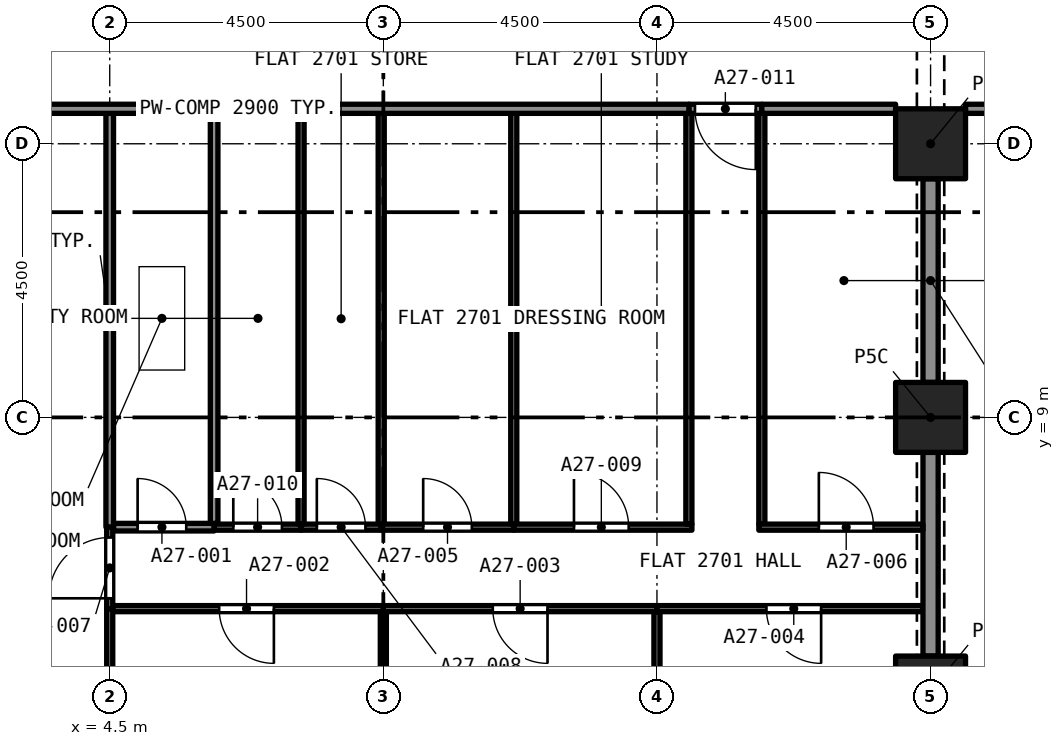
"""IFC4 building model, lengths in metres.
Left out: names, types, materials, properties, quantities, classifications, styles, units other than length and angle.
Written with IfcOpenShell. Run it as: python <this file> out.ifc"""

import sys

from ifc_helpers import new_model, si_unit, direction, frame, frame_2d, origin, origin_2d, place, context, subcontext, project, spatial, rectangle, extrude, element, fill, save


model = new_model("IFC4")
c1 = context("Model", 3, precision=1e-05, world=origin(), true_north=direction((0.0, 1.0)))
c2 = subcontext(c1, "Body", "Model", "MODEL_VIEW")
j1 = project(units=[si_unit("LENGTHUNIT", "METRE"), si_unit("PLANEANGLEUNIT", "RADIAN")], contexts=[c1])
p1 = place(None, origin())
s1 = spatial("IfcSite", under=j1, at=p1, CompositionType="ELEMENT")
p2 = place(p1, origin())
s2 = spatial("IfcBuilding", under=s1, at=p2, CompositionType="ELEMENT")
p3 = place(p2, frame((0.0, 0.0, 99.2)))
s3 = spatial("IfcBuildingStorey", under=s2, at=p3, CompositionType="ELEMENT", Elevation=99.2)
for number, where, z_axis, x_axis in (
    (1, (18.0, 4.5, 0.0), (0.0, 0.0, 1.0), (1.0, 0.0, 0.0)),
    (2, (18.0, 9.0, 0.0), (0.0, 0.0, 1.0), (1.0, 0.0, 0.0)),
    (3, (18.0, 13.5, 0.0), (0.0, 0.0, 1.0), (1.0, 0.0, 0.0)),
):
    element("IfcColumn", number, at=place(p3, frame(where, z_axis=z_axis, x_axis=x_axis)), inside=s3, PredefinedType="COLUMN", context=c2, shape_type="SweptSolid", body=[
        extrude(rectangle(XDim=1.15, YDim=1.15, at=origin_2d()), origin(), (0.0, 0.0, 1.0), 3.2),
    ])
p4 = place(p3, frame((4.562, 7.195, 0.0), z_axis=(0.0, 0.0, 1.0), x_axis=(1.0, 0.0, 0.0)))
e4 = element("IfcWall", 4, at=p4, inside=s3, PredefinedType="PARTITIONING", context=c2, shape_type="SweptSolid", body=[
    extrude(rectangle(XDim=1.655, YDim=0.125, at=frame_2d((0.827, 0.0))), origin(), (0.0, 0.0, 1.0), 2.9),
])
p5 = place(p4, frame((0.396, 0.0, 0.0)))
e5 = element("IfcOpeningElement", 5, at=p5, cuts=e4, PredefinedType="OPENING", context=c2, shape_type="SweptSolid", body=[
    extrude(rectangle(XDim=0.8, YDim=2.1, at=frame_2d((0.4, 1.05))), frame((0.0, 0.073, 0.0), z_axis=(0.0, -1.0, 0.0), x_axis=(1.0, 0.0, 0.0)), (0.0, 0.0, 1.0), 0.145),
])
p6 = place(p3, frame((4.5, 7.195, 0.0), z_axis=(0.0, 0.0, 1.0), x_axis=(0.0, 1.0, 0.0)))
e6 = element("IfcWall", 6, at=p6, inside=s3, PredefinedType="PARTITIONING", context=c2, shape_type="SweptSolid", body=[
    extrude(rectangle(XDim=6.805, YDim=0.125, at=frame_2d((3.402, 0.0))), origin(), (0.0, 0.0, 1.0), 2.9),
])
p7 = place(p3, frame((6.217, 7.258, 0.0), z_axis=(0.0, 0.0, 1.0), x_axis=(0.0, 1.0, 0.0)))
e7 = element("IfcWall", 7, at=p7, inside=s3, PredefinedType="PARTITIONING", context=c2, shape_type="SweptSolid", body=[
    extrude(rectangle(XDim=6.742, YDim=0.125, at=frame_2d((3.371, 0.0))), origin(), (0.0, 0.0, 1.0), 2.9),
])
p8 = place(p3, frame((9.0, 0.575, 0.0), z_axis=(0.0, 0.0, 1.0), x_axis=(0.0, 1.0, 0.0)))
e8 = element("IfcWall", 8, at=p8, inside=s3, PredefinedType="PARTITIONING", context=c2, shape_type="SweptSolid", body=[
    extrude(rectangle(XDim=5.23, YDim=0.1, at=frame_2d((2.615, 0.0))), origin(), (0.0, 0.0, 1.0), 2.9),
])
p9 = place(p3, frame((9.0, 5.855, 0.0), z_axis=(0.0, 0.0, 1.0), x_axis=(-1.0, 0.0, 0.0)))
e9 = element("IfcWall", 9, at=p9, inside=s3, PredefinedType="PARTITIONING", context=c2, shape_type="SweptSolid", body=[
    extrude(rectangle(XDim=4.45, YDim=0.1, at=frame_2d((2.225, 0.0))), origin(), (0.0, 0.0, 1.0), 2.9),
])
p10 = place(p9, frame((1.8, 0.0, 0.0)))
e10 = element("IfcOpeningElement", 10, at=p10, cuts=e9, PredefinedType="OPENING", context=c2, shape_type="SweptSolid", body=[
    extrude(rectangle(XDim=0.9, YDim=2.1, at=frame_2d((0.45, 1.05))), frame((0.0, 0.06, 0.0), z_axis=(0.0, -1.0, 0.0), x_axis=(1.0, 0.0, 0.0)), (0.0, 0.0, 1.0), 0.12),
])
p11 = place(p3, frame((4.5, 0.622, 0.0), z_axis=(0.0, 0.0, 1.0), x_axis=(0.0, 1.0, 0.0)))
e11 = element("IfcWall", 11, at=p11, inside=s3, PredefinedType="PARTITIONING", context=c2, shape_type="SweptSolid", body=[
    extrude(rectangle(XDim=5.233, YDim=0.1, at=frame_2d((2.616, 0.0))), origin(), (0.0, 0.0, 1.0), 2.9),
])
p12 = place(p3, frame((13.5, 0.575, 0.0), z_axis=(0.0, 0.0, 1.0), x_axis=(0.0, 1.0, 0.0)))
e12 = element("IfcWall", 12, at=p12, inside=s3, PredefinedType="PARTITIONING", context=c2, shape_type="SweptSolid", body=[
    extrude(rectangle(XDim=5.23, YDim=0.1, at=frame_2d((2.615, 0.0))), origin(), (0.0, 0.0, 1.0), 2.9),
])
p13 = place(p3, frame((13.5, 5.855, 0.0), z_axis=(0.0, 0.0, 1.0), x_axis=(-1.0, 0.0, 0.0)))
e13 = element("IfcWall", 13, at=p13, inside=s3, PredefinedType="PARTITIONING", context=c2, shape_type="SweptSolid", body=[
    extrude(rectangle(XDim=4.5, YDim=0.1, at=frame_2d((2.25, 0.0))), origin(), (0.0, 0.0, 1.0), 2.9),
])
p14 = place(p13, frame((1.8, 0.0, 0.0)))
e14 = element("IfcOpeningElement", 14, at=p14, cuts=e13, PredefinedType="OPENING", context=c2, shape_type="SweptSolid", body=[
    extrude(rectangle(XDim=0.9, YDim=2.1, at=frame_2d((0.45, 1.05))), frame((0.0, 0.06, 0.0), z_axis=(0.0, -1.0, 0.0), x_axis=(1.0, 0.0, 0.0)), (0.0, 0.0, 1.0), 0.12),
])
p15 = place(p3, frame((17.875, 5.855, 0.0), z_axis=(0.0, 0.0, 1.0), x_axis=(-1.0, 0.0, 0.0)))
e15 = element("IfcWall", 15, at=p15, inside=s3, PredefinedType="PARTITIONING", context=c2, shape_type="SweptSolid", body=[
    extrude(rectangle(XDim=4.375, YDim=0.1, at=frame_2d((2.188, 0.0))), origin(), (0.0, 0.0, 1.0), 2.9),
])
p16 = place(p15, frame((1.675, 0.0, 0.0)))
e16 = element("IfcOpeningElement", 16, at=p16, cuts=e15, PredefinedType="OPENING", context=c2, shape_type="SweptSolid", body=[
    extrude(rectangle(XDim=0.9, YDim=2.1, at=frame_2d((0.45, 1.05))), frame((0.0, 0.06, 0.0), z_axis=(0.0, -1.0, 0.0), x_axis=(1.0, 0.0, 0.0)), (0.0, 0.0, 1.0), 0.12),
])
p17 = place(p3, frame((18.0, 5.075, 0.0), z_axis=(0.0, 0.0, 1.0), x_axis=(0.0, 1.0, 0.0)))
e17 = element("IfcWall", 17, at=p17, inside=s3, PredefinedType="PARTITIONING", context=c2, shape_type="SweptSolid", body=[
    extrude(rectangle(XDim=3.35, YDim=0.25, at=frame_2d((1.675, 0.0))), origin(), (0.0, 0.0, 1.0), 2.38),
])
p18 = place(p3, frame((8.965, 7.195, 0.0), z_axis=(0.0, 0.0, 1.0), x_axis=(1.0, 0.0, 0.0)))
e18 = element("IfcWall", 18, at=p18, inside=s3, PredefinedType="PARTITIONING", context=c2, shape_type="SweptSolid", body=[
    extrude(rectangle(XDim=2.18, YDim=0.1, at=frame_2d((1.09, 0.0))), origin(), (0.0, 0.0, 1.0), 2.9),
])
p19 = place(p18, frame((0.69, 0.0, 0.0)))
e19 = element("IfcOpeningElement", 19, at=p19, cuts=e18, PredefinedType="OPENING", context=c2, shape_type="SweptSolid", body=[
    extrude(rectangle(XDim=0.8, YDim=2.1, at=frame_2d((0.4, 1.05))), frame((0.0, 0.06, 0.0), z_axis=(0.0, -1.0, 0.0), x_axis=(1.0, 0.0, 0.0)), (0.0, 0.0, 1.0), 0.12),
])
for number, where, z_axis, x_axis in (
    (20, (8.965, 7.245, 0.0), (0.0, 0.0, 1.0), (0.0, 1.0, 0.0)),
    (21, (11.145, 7.245, 0.0), (0.0, 0.0, 1.0), (0.0, 1.0, 0.0)),
    (22, (15.225, 7.245, 0.0), (0.0, 0.0, 1.0), (0.0, 1.0, 0.0)),
):
    element("IfcWall", number, at=place(p3, frame(where, z_axis=z_axis, x_axis=x_axis)), inside=s3, PredefinedType="PARTITIONING", context=c2, shape_type="SweptSolid", body=[
        extrude(rectangle(XDim=6.755, YDim=0.1, at=frame_2d((3.377, 0.0))), origin(), (0.0, 0.0, 1.0), 2.9),
    ])
p20 = place(p3, frame((15.175, 7.195, 0.0), z_axis=(0.0, 0.0, 1.0), x_axis=(1.0, 0.0, 0.0)))
e23 = element("IfcWall", 23, at=p20, inside=s3, PredefinedType="PARTITIONING", context=c2, shape_type="SweptSolid", body=[
    extrude(rectangle(XDim=2.7, YDim=0.1, at=frame_2d((1.35, 0.0))), origin(), (0.0, 0.0, 1.0), 2.9),
])
p21 = place(p20, frame((0.988, 0.0, 0.0)))
e24 = element("IfcOpeningElement", 24, at=p21, cuts=e23, PredefinedType="OPENING", context=c2, shape_type="SweptSolid", body=[
    extrude(rectangle(XDim=0.9, YDim=2.1, at=frame_2d((0.45, 1.05))), frame((0.0, 0.06, 0.0), z_axis=(0.0, -1.0, 0.0), x_axis=(1.0, 0.0, 0.0)), (0.0, 0.0, 1.0), 0.12),
])
p22 = place(p3, frame((4.5, 5.855, 0.0), z_axis=(0.0, 0.0, 1.0), x_axis=(0.0, 1.0, 0.0)))
e25 = element("IfcWall", 25, at=p22, inside=s3, PredefinedType="PARTITIONING", context=c2, shape_type="SweptSolid", body=[
    extrude(rectangle(XDim=1.34, YDim=0.1, at=frame_2d((0.67, 0.0))), origin(), (0.0, 0.0, 1.0), 2.9),
])
p23 = place(p22, frame((0.17, 0.0, 0.0)))
e26 = element("IfcOpeningElement", 26, at=p23, cuts=e25, PredefinedType="OPENING", context=c2, shape_type="SweptSolid", body=[
    extrude(rectangle(XDim=1.0, YDim=2.1, at=frame_2d((0.5, 1.05))), frame((0.0, 0.06, 0.0), z_axis=(0.0, -1.0, 0.0), x_axis=(1.0, 0.0, 0.0)), (0.0, 0.0, 1.0), 0.12),
])
p24 = place(p3, frame((7.647, 7.195, 0.0), z_axis=(0.0, 0.0, 1.0), x_axis=(1.0, 0.0, 0.0)))
e27 = element("IfcWall", 27, at=p24, inside=s3, PredefinedType="PARTITIONING", context=c2, shape_type="SweptSolid", body=[
    extrude(rectangle(XDim=1.318, YDim=0.1, at=frame_2d((0.659, 0.0))), origin(), (0.0, 0.0, 1.0), 2.9),
])
p25 = place(p24, frame((0.259, 0.0, 0.0)))
e28 = element("IfcOpeningElement", 28, at=p25, cuts=e27, PredefinedType="OPENING", context=c2, shape_type="SweptSolid", body=[
    extrude(rectangle(XDim=0.8, YDim=2.1, at=frame_2d((0.4, 1.05))), frame((0.0, 0.06, 0.0), z_axis=(0.0, -1.0, 0.0), x_axis=(1.0, 0.0, 0.0)), (0.0, 0.0, 1.0), 0.12),
])
p26 = place(p3, frame((11.145, 7.195, 0.0), z_axis=(0.0, 0.0, 1.0), x_axis=(1.0, 0.0, 0.0)))
e29 = element("IfcWall", 29, at=p26, inside=s3, PredefinedType="PARTITIONING", context=c2, shape_type="SweptSolid", body=[
    extrude(rectangle(XDim=2.93, YDim=0.1, at=frame_2d((1.465, 0.0))), origin(), (0.0, 0.0, 1.0), 2.9),
])
p27 = place(p26, frame((0.99, 0.0, 0.0)))
e30 = element("IfcOpeningElement", 30, at=p27, cuts=e29, PredefinedType="OPENING", context=c2, shape_type="SweptSolid", body=[
    extrude(rectangle(XDim=0.9, YDim=2.1, at=frame_2d((0.45, 1.05))), frame((0.0, 0.06, 0.0), z_axis=(0.0, -1.0, 0.0), x_axis=(1.0, 0.0, 0.0)), (0.0, 0.0, 1.0), 0.12),
])
p28 = place(p3, frame((14.025, 7.245, 0.0), z_axis=(0.0, 0.0, 1.0), x_axis=(0.0, 1.0, 0.0)))
e31 = element("IfcWall", 31, at=p28, inside=s3, PredefinedType="PARTITIONING", context=c2, shape_type="SweptSolid", body=[
    extrude(rectangle(XDim=6.755, YDim=0.1, at=frame_2d((3.377, 0.0))), origin(), (0.0, 0.0, 1.0), 2.9),
])
p29 = place(p3, frame((6.217, 7.195, 0.0), z_axis=(0.0, 0.0, 1.0), x_axis=(1.0, 0.0, 0.0)))
e32 = element("IfcWall", 32, at=p29, inside=s3, PredefinedType="PARTITIONING", context=c2, shape_type="SweptSolid", body=[
    extrude(rectangle(XDim=1.43, YDim=0.1, at=frame_2d((0.715, 0.0))), origin(), (0.0, 0.0, 1.0), 2.9),
])
p30 = place(p29, frame((0.315, 0.0, 0.0)))
e33 = element("IfcOpeningElement", 33, at=p30, cuts=e32, PredefinedType="OPENING", context=c2, shape_type="SweptSolid", body=[
    extrude(rectangle(XDim=0.8, YDim=2.1, at=frame_2d((0.4, 1.05))), frame((0.0, 0.06, 0.0), z_axis=(0.0, -1.0, 0.0), x_axis=(1.0, 0.0, 0.0)), (0.0, 0.0, 1.0), 0.12),
])
p31 = place(p3, frame((15.225, 14.075, 0.0), z_axis=(0.0, 0.0, 1.0), x_axis=(-1.0, 0.0, 0.0)))
e34 = element("IfcWall", 34, at=p31, inside=s3, PredefinedType="PARTITIONING", context=c2, shape_type="SweptSolid", body=[
    extrude(rectangle(XDim=1.2, YDim=0.15, at=frame_2d((0.6, 0.0))), origin(), (0.0, 0.0, 1.0), 2.9),
])
p32 = place(p31, frame((0.1, 0.0, 0.0)))
e35 = element("IfcOpeningElement", 35, at=p32, cuts=e34, PredefinedType="OPENING", context=c2, shape_type="SweptSolid", body=[
    extrude(rectangle(XDim=1.0, YDim=2.1, at=frame_2d((0.5, 1.05))), frame((0.0, 0.085, 0.0), z_axis=(0.0, -1.0, 0.0), x_axis=(1.0, 0.0, 0.0)), (0.0, 0.0, 1.0), 0.17),
])
p33 = place(p3, frame((18.0, 9.575, 0.0), z_axis=(0.0, 0.0, 1.0), x_axis=(0.0, 1.0, 0.0)))
e36 = element("IfcWall", 36, at=p33, inside=s3, PredefinedType="PARTITIONING", context=c2, shape_type="SweptSolid", body=[
    extrude(rectangle(XDim=3.35, YDim=0.25, at=frame_2d((1.675, 0.0))), origin(), (0.0, 0.0, 1.0), 2.38),
])
p34 = place(p3, frame((15.225, 14.075, 0.0), z_axis=(0.0, 0.0, 1.0), x_axis=(1.0, 0.0, 0.0)))
e37 = element("IfcWall", 37, at=p34, inside=s3, PredefinedType="PARTITIONING", context=c2, shape_type="SweptSolid", body=[
    extrude(rectangle(XDim=2.2, YDim=0.15, at=frame_2d((1.1, 0.0))), origin(), (0.0, 0.0, 1.0), 2.9),
])
p35 = place(p3, frame((0.575, 14.075, 0.0), z_axis=(0.0, 0.0, 1.0), x_axis=(1.0, 0.0, 0.0)))
e38 = element("IfcWall", 38, at=p35, inside=s3, PredefinedType="PARTITIONING", context=c2, shape_type="SweptSolid", body=[
    extrude(rectangle(XDim=13.45, YDim=0.15, at=frame_2d((6.725, 0.0))), origin(), (0.0, 0.0, 1.0), 2.9),
])
p36 = place(p3, frame((7.647, 7.245, 0.0), z_axis=(0.0, 0.0, 1.0), x_axis=(0.0, 1.0, 0.0)))
e39 = element("IfcWall", 39, at=p36, inside=s3, PredefinedType="PARTITIONING", context=c2, shape_type="SweptSolid", body=[
    extrude(rectangle(XDim=6.755, YDim=0.1, at=frame_2d((3.377, 0.0))), origin(), (0.0, 0.0, 1.0), 2.9),
])
p37 = place(p3, frame((27.0, 14.075, 0.0), z_axis=(0.0, 0.0, 1.0), x_axis=(-1.0, 0.0, 0.0)))
e40 = element("IfcWall", 40, at=p37, inside=s3, PredefinedType="PARTITIONING", context=c2, shape_type="SweptSolid", body=[
    extrude(rectangle(XDim=8.425, YDim=0.15, at=frame_2d((4.212, 0.0))), origin(), (0.0, 0.0, 1.0), 2.75),
])
p38 = place(p37, frame((4.0, 0.0, 0.0)))
e41 = element("IfcOpeningElement", 41, at=p38, cuts=e40, PredefinedType="OPENING", context=c2, shape_type="SweptSolid", body=[
    extrude(rectangle(XDim=1.0, YDim=2.1, at=frame_2d((0.5, 1.05))), frame((0.0, 0.085, 0.0), z_axis=(0.0, -1.0, 0.0), x_axis=(1.0, 0.0, 0.0)), (0.0, 0.0, 1.0), 0.17),
])
p39 = place(p5, origin())
e42 = element("IfcDoor", 42, at=p39, inside=s3, OperationType="SINGLE_SWING_LEFT", PredefinedType="DOOR", context=c2, shape_type="SweptSolid", body=[
    extrude(rectangle(XDim=0.8, YDim=2.1, at=frame_2d((0.4, 1.05))), frame((0.0, 0.025, 0.0), z_axis=(0.0, -1.0, 0.0), x_axis=(1.0, 0.0, 0.0)), (0.0, 0.0, 1.0), 0.05),
])
fill(e5, e42)
p40 = place(p10, origin())
e43 = element("IfcDoor", 43, at=p40, inside=s3, OperationType="SINGLE_SWING_RIGHT", PredefinedType="DOOR", context=c2, shape_type="SweptSolid", body=[
    extrude(rectangle(XDim=0.9, YDim=2.1, at=frame_2d((0.45, 1.05))), frame((0.0, 0.025, 0.0), z_axis=(0.0, -1.0, 0.0), x_axis=(1.0, 0.0, 0.0)), (0.0, 0.0, 1.0), 0.05),
])
fill(e10, e43)
p41 = place(p14, origin())
e44 = element("IfcDoor", 44, at=p41, inside=s3, OperationType="SINGLE_SWING_LEFT", PredefinedType="DOOR", context=c2, shape_type="SweptSolid", body=[
    extrude(rectangle(XDim=0.9, YDim=2.1, at=frame_2d((0.45, 1.05))), frame((0.0, 0.025, 0.0), z_axis=(0.0, -1.0, 0.0), x_axis=(1.0, 0.0, 0.0)), (0.0, 0.0, 1.0), 0.05),
])
fill(e14, e44)
p42 = place(p16, origin())
e45 = element("IfcDoor", 45, at=p42, inside=s3, OperationType="SINGLE_SWING_LEFT", PredefinedType="DOOR", context=c2, shape_type="SweptSolid", body=[
    extrude(rectangle(XDim=0.9, YDim=2.1, at=frame_2d((0.45, 1.05))), frame((0.0, 0.025, 0.0), z_axis=(0.0, -1.0, 0.0), x_axis=(1.0, 0.0, 0.0)), (0.0, 0.0, 1.0), 0.05),
])
fill(e16, e45)
p43 = place(p19, origin())
e46 = element("IfcDoor", 46, at=p43, inside=s3, OperationType="SINGLE_SWING_RIGHT", PredefinedType="DOOR", context=c2, shape_type="SweptSolid", body=[
    extrude(rectangle(XDim=0.8, YDim=2.1, at=frame_2d((0.4, 1.05))), frame((0.0, 0.025, 0.0), z_axis=(0.0, -1.0, 0.0), x_axis=(1.0, 0.0, 0.0)), (0.0, 0.0, 1.0), 0.05),
])
fill(e19, e46)
p44 = place(p21, origin())
e47 = element("IfcDoor", 47, at=p44, inside=s3, OperationType="SINGLE_SWING_RIGHT", PredefinedType="DOOR", context=c2, shape_type="SweptSolid", body=[
    extrude(rectangle(XDim=0.9, YDim=2.1, at=frame_2d((0.45, 1.05))), frame((0.0, 0.025, 0.0), z_axis=(0.0, -1.0, 0.0), x_axis=(1.0, 0.0, 0.0)), (0.0, 0.0, 1.0), 0.05),
])
fill(e24, e47)
p45 = place(p23, origin())
e48 = element("IfcDoor", 48, at=p45, inside=s3, OperationType="SINGLE_SWING_RIGHT", PredefinedType="DOOR", context=c2, shape_type="SweptSolid", body=[
    extrude(rectangle(XDim=1.0, YDim=2.1, at=frame_2d((0.5, 1.05))), frame((0.0, 0.025, 0.0), z_axis=(0.0, -1.0, 0.0), x_axis=(1.0, 0.0, 0.0)), (0.0, 0.0, 1.0), 0.05),
])
fill(e26, e48)
p46 = place(p25, origin())
e49 = element("IfcDoor", 49, at=p46, inside=s3, OperationType="SINGLE_SWING_RIGHT", PredefinedType="DOOR", context=c2, shape_type="SweptSolid", body=[
    extrude(rectangle(XDim=0.8, YDim=2.1, at=frame_2d((0.4, 1.05))), frame((0.0, 0.025, 0.0), z_axis=(0.0, -1.0, 0.0), x_axis=(1.0, 0.0, 0.0)), (0.0, 0.0, 1.0), 0.05),
])
fill(e28, e49)
p47 = place(p27, origin())
e50 = element("IfcDoor", 50, at=p47, inside=s3, OperationType="SINGLE_SWING_LEFT", PredefinedType="DOOR", context=c2, shape_type="SweptSolid", body=[
    extrude(rectangle(XDim=0.9, YDim=2.1, at=frame_2d((0.45, 1.05))), frame((0.0, 0.025, 0.0), z_axis=(0.0, -1.0, 0.0), x_axis=(1.0, 0.0, 0.0)), (0.0, 0.0, 1.0), 0.05),
])
fill(e30, e50)
p48 = place(p30, origin())
e51 = element("IfcDoor", 51, at=p48, inside=s3, OperationType="SINGLE_SWING_RIGHT", PredefinedType="DOOR", context=c2, shape_type="SweptSolid", body=[
    extrude(rectangle(XDim=0.8, YDim=2.1, at=frame_2d((0.4, 1.05))), frame((0.0, 0.025, 0.0), z_axis=(0.0, -1.0, 0.0), x_axis=(1.0, 0.0, 0.0)), (0.0, 0.0, 1.0), 0.05),
])
fill(e33, e51)
p49 = place(p32, origin())
e52 = element("IfcDoor", 52, at=p49, inside=s3, OperationType="SINGLE_SWING_RIGHT", PredefinedType="DOOR", context=c2, shape_type="SweptSolid", body=[
    extrude(rectangle(XDim=1.0, YDim=2.1, at=frame_2d((0.5, 1.05))), frame((0.0, 0.025, 0.0), z_axis=(0.0, -1.0, 0.0), x_axis=(1.0, 0.0, 0.0)), (0.0, 0.0, 1.0), 0.05),
])
fill(e35, e52)
save(model, sys.argv[1])
